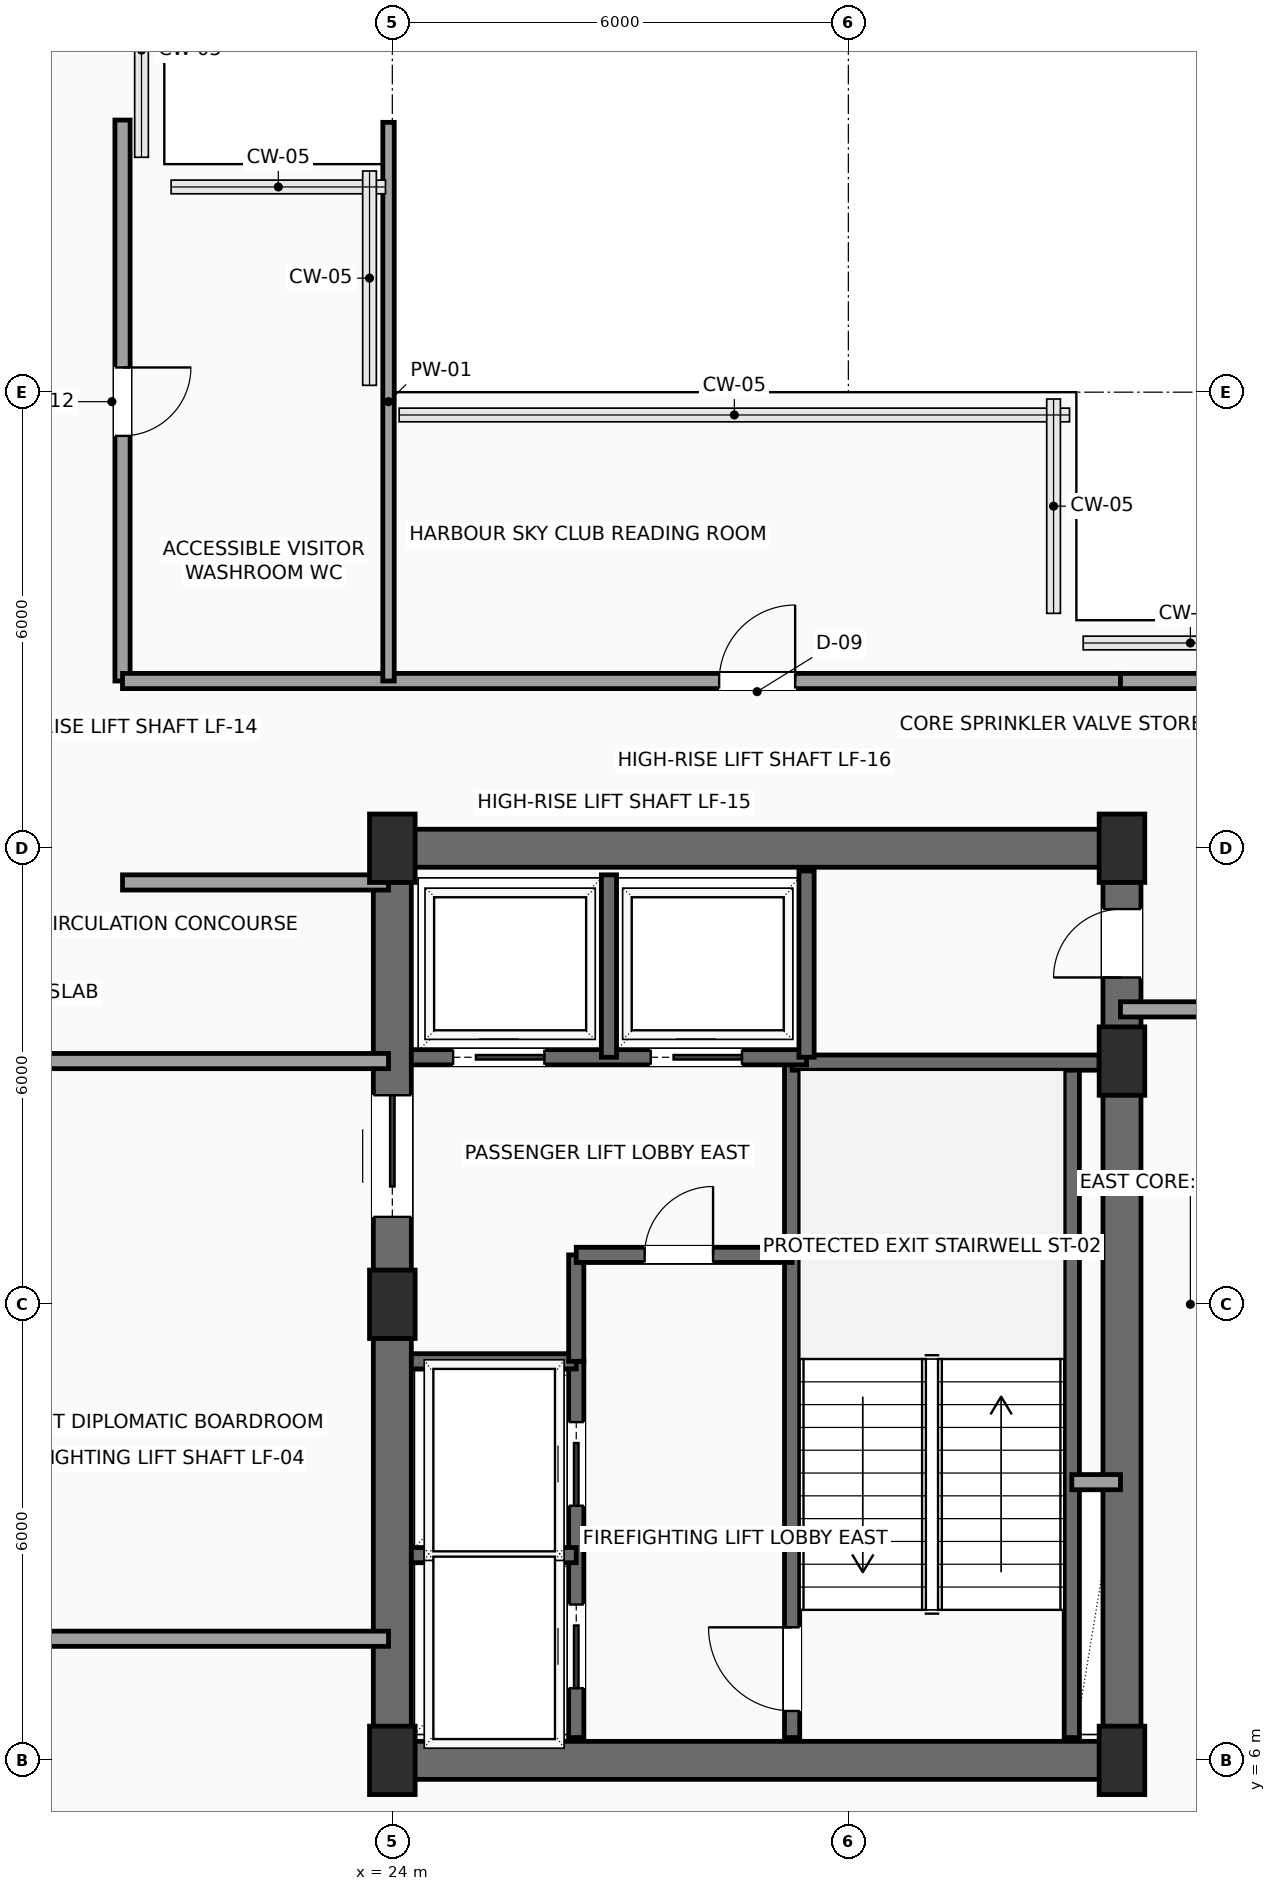
"""IFC4 building model, lengths in metres.
Left out: names, types, materials, properties, quantities, classifications, styles, units other than length and angle.
Written with IfcOpenShell. Run it as: python <this file> out.ifc"""

import sys

from ifc_helpers import new_model, si_unit, direction, frame, frame_2d, origin, origin_2d, place, context, subcontext, project, spatial, rectangle, extrude, element, fill, save


model = new_model("IFC4")
c1 = context("Model", 3, precision=1e-05, world=origin(), true_north=direction((0.0, 1.0)))
c2 = subcontext(c1, "Body", "Model", "MODEL_VIEW")
j1 = project(units=[si_unit("LENGTHUNIT", "METRE"), si_unit("PLANEANGLEUNIT", "RADIAN")], contexts=[c1])
p1 = place(None, origin())
s1 = spatial("IfcSite", under=j1, at=p1, CompositionType="ELEMENT")
p2 = place(p1, origin())
s2 = spatial("IfcBuilding", under=s1, at=p2, CompositionType="ELEMENT")
p3 = place(p2, frame((0.0, 0.0, 278.2)))
s3 = spatial("IfcBuildingStorey", under=s2, at=p3, CompositionType="ELEMENT", Elevation=278.2)
for number, where, z_axis, x_axis in (
    (1, (24.0, 6.0, 0.0), (0.0, 0.0, 1.0), (1.0, 0.0, 0.0)),
    (2, (24.0, 12.0, 0.0), (0.0, 0.0, 1.0), (1.0, 0.0, 0.0)),
    (3, (24.0, 18.0, 0.0), (0.0, 0.0, 1.0), (1.0, 0.0, 0.0)),
    (4, (33.6, 6.0, 0.0), (0.0, 0.0, 1.0), (1.0, 0.0, 0.0)),
    (5, (33.6, 15.2, 0.0), (0.0, 0.0, 1.0), (1.0, 0.0, 0.0)),
    (6, (33.6, 18.0, 0.0), (0.0, 0.0, 1.0), (1.0, 0.0, 0.0)),
):
    element("IfcColumn", number, at=place(p3, frame(where, z_axis=z_axis, x_axis=x_axis)), inside=s3, PredefinedType="COLUMN", context=c2, shape_type="SweptSolid", body=[
        extrude(rectangle(XDim=0.6, YDim=0.9, at=origin_2d()), origin(), (0.0, 0.0, 1.0), 3.5),
    ])
for number, where, z_axis, x_axis in (
    (7, (24.0, 6.0, 0.0), (0.0, 0.0, 1.0), (1.0, 0.0, 0.0)),
    (8, (24.0, 18.0, 0.0), (0.0, 0.0, 1.0), (1.0, 0.0, 0.0)),
):
    element("IfcWall", number, at=place(p3, frame(where, z_axis=z_axis, x_axis=x_axis)), inside=s3, PredefinedType="SHEAR", context=c2, shape_type="SweptSolid", body=[
        extrude(rectangle(XDim=9.6, YDim=0.5, at=frame_2d((4.8, 0.0))), origin(), (0.0, 0.0, 1.0), 3.3),
    ])
p4 = place(p3, frame((24.0, 6.0, 0.0), z_axis=(0.0, 0.0, 1.0), x_axis=(0.0, 1.0, 0.0)))
e9 = element("IfcWall", 9, at=p4, inside=s3, PredefinedType="SHEAR", context=c2, shape_type="SweptSolid", body=[
    extrude(rectangle(XDim=12.0, YDim=0.5, at=frame_2d((6.0, 0.0))), origin(), (0.0, 0.0, 1.0), 3.3),
])
p5 = place(p4, frame((7.15, 0.0, 0.0)))
e10 = element("IfcOpeningElement", 10, at=p5, cuts=e9, PredefinedType="OPENING", context=c2, shape_type="SweptSolid", body=[
    extrude(rectangle(XDim=1.6, YDim=2.3, at=frame_2d((0.8, 1.15))), frame((0.0, 0.26, 0.0), z_axis=(0.0, -1.0, 0.0), x_axis=(1.0, 0.0, 0.0)), (0.0, 0.0, 1.0), 0.52),
])
p6 = place(p3, frame((33.6, 6.0, 0.0), z_axis=(0.0, 0.0, 1.0), x_axis=(0.0, 1.0, 0.0)))
e11 = element("IfcWall", 11, at=p6, inside=s3, PredefinedType="SHEAR", context=c2, shape_type="SweptSolid", body=[
    extrude(rectangle(XDim=12.0, YDim=0.5, at=frame_2d((6.0, 0.0))), origin(), (0.0, 0.0, 1.0), 3.3),
])
p7 = place(p6, frame((10.3, 0.0, 0.0)))
e12 = element("IfcOpeningElement", 12, at=p7, cuts=e11, PredefinedType="OPENING", context=c2, shape_type="SweptSolid", body=[
    extrude(rectangle(XDim=0.9, YDim=2.15, at=frame_2d((0.45, 1.075))), frame((0.0, 0.26, 0.0), z_axis=(0.0, -1.0, 0.0), x_axis=(1.0, 0.0, 0.0)), (0.0, 0.0, 1.0), 0.52),
])
p8 = place(p3, frame((29.26, 6.3, 0.0), z_axis=(0.0, 0.0, 1.0), x_axis=(0.0, 1.0, 0.0)))
e13 = element("IfcWall", 13, at=p8, inside=s3, PredefinedType="SHEAR", context=c2, shape_type="SweptSolid", body=[
    extrude(rectangle(XDim=8.88, YDim=0.2, at=frame_2d((4.44, 0.0))), origin(), (0.0, 0.0, 1.0), 3.3),
])
p9 = place(p8, frame((0.35, 0.0, 0.0)))
e14 = element("IfcOpeningElement", 14, at=p9, cuts=e13, PredefinedType="OPENING", context=c2, shape_type="SweptSolid", body=[
    extrude(rectangle(XDim=1.1, YDim=2.2, at=frame_2d((0.55, 1.1))), frame((0.0, 0.11, 0.0), z_axis=(0.0, -1.0, 0.0), x_axis=(1.0, 0.0, 0.0)), (0.0, 0.0, 1.0), 0.22),
])
p10 = place(p3, frame((32.94, 6.3, 0.0), z_axis=(0.0, 0.0, 1.0), x_axis=(0.0, 1.0, 0.0)))
e15 = element("IfcWall", 15, at=p10, inside=s3, PredefinedType="SHEAR", context=c2, shape_type="SweptSolid", body=[
    extrude(rectangle(XDim=8.88, YDim=0.2, at=frame_2d((4.44, 0.0))), origin(), (0.0, 0.0, 1.0), 3.3),
])
p11 = place(p3, frame((29.26, 15.18, 0.0), z_axis=(0.0, 0.0, 1.0), x_axis=(1.0, 0.0, 0.0)))
e16 = element("IfcWall", 16, at=p11, inside=s3, PredefinedType="SHEAR", context=c2, shape_type="SweptSolid", body=[
    extrude(rectangle(XDim=4.04, YDim=0.2, at=frame_2d((2.02, 0.0))), origin(), (0.0, 0.0, 1.0), 3.3),
])
p12 = place(p3, frame((26.42, 6.3, 0.0), z_axis=(0.0, 0.0, 1.0), x_axis=(0.0, 1.0, 0.0)))
e17 = element("IfcWall", 17, at=p12, inside=s3, PredefinedType="SHEAR", context=c2, shape_type="SweptSolid", body=[
    extrude(rectangle(XDim=4.95, YDim=0.2, at=frame_2d((2.475, 0.0))), origin(), (0.0, 0.0, 1.0), 3.3),
])
p13 = place(p12, frame((0.65, 0.0, 0.0)))
e18 = element("IfcOpeningElement", 18, at=p13, cuts=e17, PredefinedType="OPENING", context=c2, shape_type="SweptSolid", body=[
    extrude(rectangle(XDim=1.1, YDim=2.2, at=frame_2d((0.55, 1.1))), frame((0.0, 0.11, 0.0), z_axis=(0.0, -1.0, 0.0), x_axis=(1.0, 0.0, 0.0)), (0.0, 0.0, 1.0), 0.22),
])
p14 = place(p12, frame((3.05, 0.0, 0.0)))
e19 = element("IfcOpeningElement", 19, at=p14, cuts=e17, PredefinedType="OPENING", context=c2, shape_type="SweptSolid", body=[
    extrude(rectangle(XDim=1.1, YDim=2.2, at=frame_2d((0.55, 1.1))), frame((0.0, 0.11, 0.0), z_axis=(0.0, -1.0, 0.0), x_axis=(1.0, 0.0, 0.0)), (0.0, 0.0, 1.0), 0.22),
])
for number, where, z_axis, x_axis in (
    (20, (24.25, 8.7, 0.0), (0.0, 0.0, 1.0), (1.0, 0.0, 0.0)),
    (21, (24.25, 11.25, 0.0), (0.0, 0.0, 1.0), (1.0, 0.0, 0.0)),
):
    element("IfcWall", number, at=place(p3, frame(where, z_axis=z_axis, x_axis=x_axis)), inside=s3, PredefinedType="SHEAR", context=c2, shape_type="SweptSolid", body=[
        extrude(rectangle(XDim=2.17, YDim=0.2, at=frame_2d((1.085, 0.0))), origin(), (0.0, 0.0, 1.0), 3.3),
    ])
p15 = place(p3, frame((26.42, 11.25, 0.0), z_axis=(0.0, 0.0, 1.0), x_axis=(0.0, 1.0, 0.0)))
e22 = element("IfcWall", 22, at=p15, inside=s3, PredefinedType="SHEAR", context=c2, shape_type="SweptSolid", body=[
    extrude(rectangle(XDim=1.4, YDim=0.2, at=frame_2d((0.7, 0.0))), origin(), (0.0, 0.0, 1.0), 3.3),
])
p16 = place(p3, frame((26.42, 12.65, 0.0), z_axis=(0.0, 0.0, 1.0), x_axis=(1.0, 0.0, 0.0)))
e23 = element("IfcWall", 23, at=p16, inside=s3, PredefinedType="SHEAR", context=c2, shape_type="SweptSolid", body=[
    extrude(rectangle(XDim=2.84, YDim=0.2, at=frame_2d((1.42, 0.0))), origin(), (0.0, 0.0, 1.0), 3.3),
])
p17 = place(p16, frame((0.9, 0.0, 0.0)))
e24 = element("IfcOpeningElement", 24, at=p17, cuts=e23, PredefinedType="OPENING", context=c2, shape_type="SweptSolid", body=[
    extrude(rectangle(XDim=0.9, YDim=2.15, at=frame_2d((0.45, 1.075))), frame((0.0, 0.11, 0.0), z_axis=(0.0, -1.0, 0.0), x_axis=(1.0, 0.0, 0.0)), (0.0, 0.0, 1.0), 0.22),
])
p18 = place(p3, frame((32.94, 9.66, 0.0), z_axis=(0.0, 0.0, 1.0), x_axis=(1.0, 0.0, 0.0)))
e25 = element("IfcWall", 25, at=p18, inside=s3, PredefinedType="SOLIDWALL", context=c2, shape_type="SweptSolid", body=[
    extrude(rectangle(XDim=0.64, YDim=0.2, at=frame_2d((0.32, 0.0))), origin(), (0.0, 0.0, 1.0), 3.3),
])
p19 = place(p3, frame((24.25, 15.25, 0.0), z_axis=(0.0, 0.0, 1.0), x_axis=(1.0, 0.0, 0.0)))
e26 = element("IfcWall", 26, at=p19, inside=s3, PredefinedType="SHEAR", context=c2, shape_type="SweptSolid", body=[
    extrude(rectangle(XDim=5.2, YDim=0.2, at=frame_2d((2.6, 0.0))), origin(), (0.0, 0.0, 1.0), 3.3),
])
p20 = place(p19, frame((0.55, 0.0, 0.0)))
e27 = element("IfcOpeningElement", 27, at=p20, cuts=e26, PredefinedType="OPENING", context=c2, shape_type="SweptSolid", body=[
    extrude(rectangle(XDim=1.2, YDim=2.2, at=frame_2d((0.6, 1.1))), frame((0.0, 0.11, 0.0), z_axis=(0.0, -1.0, 0.0), x_axis=(1.0, 0.0, 0.0)), (0.0, 0.0, 1.0), 0.22),
])
p21 = place(p19, frame((3.15, 0.0, 0.0)))
e28 = element("IfcOpeningElement", 28, at=p21, cuts=e26, PredefinedType="OPENING", context=c2, shape_type="SweptSolid", body=[
    extrude(rectangle(XDim=1.2, YDim=2.2, at=frame_2d((0.6, 1.1))), frame((0.0, 0.11, 0.0), z_axis=(0.0, -1.0, 0.0), x_axis=(1.0, 0.0, 0.0)), (0.0, 0.0, 1.0), 0.22),
])
p22 = place(p3, frame((26.85, 15.25, 0.0), z_axis=(0.0, 0.0, 1.0), x_axis=(0.0, 1.0, 0.0)))
e29 = element("IfcWall", 29, at=p22, inside=s3, PredefinedType="SHEAR", context=c2, shape_type="SweptSolid", body=[
    extrude(rectangle(XDim=2.4, YDim=0.2, at=frame_2d((1.2, 0.0))), origin(), (0.0, 0.0, 1.0), 3.3),
])
p23 = place(p3, frame((29.45, 15.25, 0.0), z_axis=(0.0, 0.0, 1.0), x_axis=(0.0, 1.0, 0.0)))
e30 = element("IfcWall", 30, at=p23, inside=s3, PredefinedType="SHEAR", context=c2, shape_type="SweptSolid", body=[
    extrude(rectangle(XDim=2.45, YDim=0.2, at=frame_2d((1.225, 0.0))), origin(), (0.0, 0.0, 1.0), 3.3),
])
p24 = place(p3, frame((20.45, 27.58, 0.0), z_axis=(0.0, 0.0, 1.0), x_axis=(0.0, -1.0, 0.0)))
e31 = element("IfcWall", 31, at=p24, inside=s3, PredefinedType="SOLIDWALL", context=c2, shape_type="SweptSolid", body=[
    extrude(rectangle(XDim=7.38, YDim=0.2, at=frame_2d((3.69, 0.0))), origin(), (0.0, 0.0, 1.0), 3.3),
])
p25 = place(p24, frame((3.255, 0.0, 0.0)))
e32 = element("IfcOpeningElement", 32, at=p25, cuts=e31, PredefinedType="OPENING", context=c2, shape_type="SweptSolid", body=[
    extrude(rectangle(XDim=0.9, YDim=2.1, at=frame_2d((0.45, 1.05))), frame((0.0, 0.11, 0.0), z_axis=(0.0, -1.0, 0.0), x_axis=(1.0, 0.0, 0.0)), (0.0, 0.0, 1.0), 0.22),
])
p26 = place(p3, frame((20.45, 20.2, 0.0), z_axis=(0.0, 0.0, 1.0), x_axis=(1.0, 0.0, 0.0)))
e33 = element("IfcWall", 33, at=p26, inside=s3, PredefinedType="SOLIDWALL", context=c2, shape_type="SweptSolid", body=[
    extrude(rectangle(XDim=13.13, YDim=0.2, at=frame_2d((6.565, 0.0))), origin(), (0.0, 0.0, 1.0), 3.3),
])
p27 = place(p26, frame((7.85, 0.0, 0.0)))
e34 = element("IfcOpeningElement", 34, at=p27, cuts=e33, PredefinedType="OPENING", context=c2, shape_type="SweptSolid", body=[
    extrude(rectangle(XDim=1.0, YDim=2.2, at=frame_2d((0.5, 1.1))), frame((0.0, 0.11, 0.0), z_axis=(0.0, -1.0, 0.0), x_axis=(1.0, 0.0, 0.0)), (0.0, 0.0, 1.0), 0.22),
])
for number, where, z_axis, x_axis in (
    (35, (33.58, 20.2, 0.0), (0.0, 0.0, 1.0), (1.0, 0.0, 0.0)),
    (36, (35.7, 15.88, 0.0), (0.0, 0.0, 1.0), (-1.0, 0.0, 0.0)),
):
    element("IfcWall", number, at=place(p3, frame(where, z_axis=z_axis, x_axis=x_axis)), inside=s3, PredefinedType="SOLIDWALL", context=c2, shape_type="SweptSolid", body=[
        extrude(rectangle(XDim=2.12, YDim=0.2, at=frame_2d((1.06, 0.0))), origin(), (0.0, 0.0, 1.0), 3.3),
    ])
p28 = place(p3, frame((20.45, 17.55, 0.0), z_axis=(0.0, 0.0, 1.0), x_axis=(1.0, 0.0, 0.0)))
e37 = element("IfcWall", 37, at=p28, inside=s3, PredefinedType="SOLIDWALL", context=c2, shape_type="SweptSolid", body=[
    extrude(rectangle(XDim=3.5, YDim=0.2, at=frame_2d((1.75, 0.0))), origin(), (0.0, 0.0, 1.0), 3.3),
])
p29 = place(p3, frame((23.95, 15.2, 0.0), z_axis=(0.0, 0.0, 1.0), x_axis=(-1.0, 0.0, 0.0)))
e38 = element("IfcWall", 38, at=p29, inside=s3, PredefinedType="SOLIDWALL", context=c2, shape_type="SweptSolid", body=[
    extrude(rectangle(XDim=9.0, YDim=0.2, at=frame_2d((4.5, 0.0))), origin(), (0.0, 0.0, 1.0), 2.932),
])
p30 = place(p3, frame((23.95, 20.2, 0.0), z_axis=(0.0, 0.0, 1.0), x_axis=(0.0, 1.0, 0.0)))
e39 = element("IfcWall", 39, at=p30, inside=s3, PredefinedType="PARTITIONING", context=c2, shape_type="SweptSolid", body=[
    extrude(rectangle(XDim=7.35, YDim=0.15, at=frame_2d((3.675, 0.0))), origin(), (0.0, 0.0, 1.0), 3.3),
])
p31 = place(p3, frame((14.95, 7.6, 0.0), z_axis=(0.0, 0.0, 1.0), x_axis=(1.0, 0.0, 0.0)))
e40 = element("IfcWall", 40, at=p31, inside=s3, PredefinedType="PARTITIONING", context=c2, shape_type="SweptSolid", body=[
    extrude(rectangle(XDim=9.0, YDim=0.2, at=frame_2d((4.5, 0.0))), origin(), (0.0, 0.0, 1.0), 3.3),
])
p32 = place(p5, origin())
e41 = element("IfcDoor", 41, at=p32, inside=s3, OperationType="DOUBLE_DOOR_SLIDING", PredefinedType="DOOR", context=c2, shape_type="SweptSolid", body=[
    extrude(rectangle(XDim=1.6, YDim=2.3, at=frame_2d((0.8, 1.15))), frame((0.0, 0.025, 0.0), z_axis=(0.0, -1.0, 0.0), x_axis=(1.0, 0.0, 0.0)), (0.0, 0.0, 1.0), 0.05),
])
fill(e10, e41)
p33 = place(p7, origin())
e42 = element("IfcDoor", 42, at=p33, inside=s3, OperationType="SINGLE_SWING_LEFT", PredefinedType="DOOR", context=c2, shape_type="SweptSolid", body=[
    extrude(rectangle(XDim=0.9, YDim=2.15, at=frame_2d((0.45, 1.075))), frame((0.0, 0.025, 0.0), z_axis=(0.0, -1.0, 0.0), x_axis=(1.0, 0.0, 0.0)), (0.0, 0.0, 1.0), 0.05),
])
fill(e12, e42)
p34 = place(p9, origin())
e43 = element("IfcDoor", 43, at=p34, inside=s3, OperationType="SINGLE_SWING_RIGHT", PredefinedType="DOOR", context=c2, shape_type="SweptSolid", body=[
    extrude(rectangle(XDim=1.1, YDim=2.2, at=frame_2d((0.55, 1.1))), frame((0.0, 0.025, 0.0), z_axis=(0.0, -1.0, 0.0), x_axis=(1.0, 0.0, 0.0)), (0.0, 0.0, 1.0), 0.05),
])
fill(e14, e43)
p35 = place(p13, origin())
e44 = element("IfcDoor", 44, at=p35, inside=s3, OperationType="SLIDING_TO_LEFT", PredefinedType="DOOR", context=c2, shape_type="SweptSolid", body=[
    extrude(rectangle(XDim=1.1, YDim=2.2, at=frame_2d((0.55, 1.1))), frame((0.0, 0.025, 0.0), z_axis=(0.0, -1.0, 0.0), x_axis=(1.0, 0.0, 0.0)), (0.0, 0.0, 1.0), 0.05),
])
fill(e18, e44)
p36 = place(p14, origin())
e45 = element("IfcDoor", 45, at=p36, inside=s3, OperationType="SLIDING_TO_LEFT", PredefinedType="DOOR", context=c2, shape_type="SweptSolid", body=[
    extrude(rectangle(XDim=1.1, YDim=2.2, at=frame_2d((0.55, 1.1))), frame((0.0, 0.025, 0.0), z_axis=(0.0, -1.0, 0.0), x_axis=(1.0, 0.0, 0.0)), (0.0, 0.0, 1.0), 0.05),
])
fill(e19, e45)
p37 = place(p17, origin())
e46 = element("IfcDoor", 46, at=p37, inside=s3, OperationType="SINGLE_SWING_RIGHT", PredefinedType="DOOR", context=c2, shape_type="SweptSolid", body=[
    extrude(rectangle(XDim=0.9, YDim=2.15, at=frame_2d((0.45, 1.075))), frame((0.0, 0.025, 0.0), z_axis=(0.0, -1.0, 0.0), x_axis=(1.0, 0.0, 0.0)), (0.0, 0.0, 1.0), 0.05),
])
fill(e24, e46)
p38 = place(p20, origin())
e47 = element("IfcDoor", 47, at=p38, inside=s3, OperationType="SLIDING_TO_RIGHT", PredefinedType="DOOR", context=c2, shape_type="SweptSolid", body=[
    extrude(rectangle(XDim=1.2, YDim=2.2, at=frame_2d((0.6, 1.1))), frame((0.0, 0.025, 0.0), z_axis=(0.0, -1.0, 0.0), x_axis=(1.0, 0.0, 0.0)), (0.0, 0.0, 1.0), 0.05),
])
fill(e27, e47)
p39 = place(p21, origin())
e48 = element("IfcDoor", 48, at=p39, inside=s3, OperationType="SLIDING_TO_RIGHT", PredefinedType="DOOR", context=c2, shape_type="SweptSolid", body=[
    extrude(rectangle(XDim=1.2, YDim=2.2, at=frame_2d((0.6, 1.1))), frame((0.0, 0.025, 0.0), z_axis=(0.0, -1.0, 0.0), x_axis=(1.0, 0.0, 0.0)), (0.0, 0.0, 1.0), 0.05),
])
fill(e28, e48)
p40 = place(p25, origin())
e49 = element("IfcDoor", 49, at=p40, inside=s3, OperationType="SINGLE_SWING_LEFT", PredefinedType="DOOR", context=c2, shape_type="SweptSolid", body=[
    extrude(rectangle(XDim=0.9, YDim=2.1, at=frame_2d((0.45, 1.05))), frame((0.0, 0.025, 0.0), z_axis=(0.0, -1.0, 0.0), x_axis=(1.0, 0.0, 0.0)), (0.0, 0.0, 1.0), 0.05),
])
fill(e32, e49)
p41 = place(p27, origin())
e50 = element("IfcDoor", 50, at=p41, inside=s3, OperationType="SINGLE_SWING_RIGHT", PredefinedType="DOOR", context=c2, shape_type="SweptSolid", body=[
    extrude(rectangle(XDim=1.0, YDim=2.2, at=frame_2d((0.5, 1.1))), frame((0.0, 0.025, 0.0), z_axis=(0.0, -1.0, 0.0), x_axis=(1.0, 0.0, 0.0)), (0.0, 0.0, 1.0), 0.05),
])
fill(e34, e50)
save(model, sys.argv[1])
